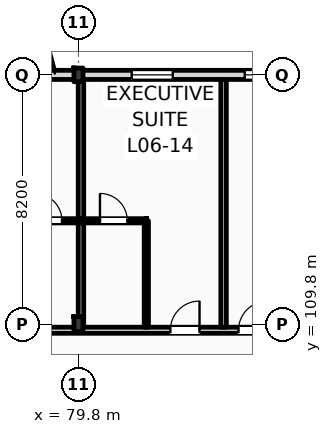
"""IFC4 building model, lengths in metres.
Left out: names, types, materials, properties, quantities, classifications, styles, units other than length and angle.
Written with IfcOpenShell. Run it as: python <this file> out.ifc"""

import sys

from ifc_helpers import new_model, si_unit, direction, frame, frame_2d, origin, origin_2d, place, context, subcontext, project, spatial, rectangle, i_section, extrude, element, fill, save


model = new_model("IFC4")
c1 = context("Model", 3, precision=1e-05, world=origin(), true_north=direction((0.0, 1.0)))
c2 = subcontext(c1, "Body", "Model", "MODEL_VIEW")
j1 = project(units=[si_unit("LENGTHUNIT", "METRE"), si_unit("PLANEANGLEUNIT", "RADIAN")], contexts=[c1])
p1 = place(None, origin())
s1 = spatial("IfcSite", under=j1, at=p1, CompositionType="ELEMENT")
p2 = place(p1, origin())
s2 = spatial("IfcBuilding", under=s1, at=p2, CompositionType="ELEMENT")
p3 = place(p2, frame((0.0, 0.0, 28.2)))
s3 = spatial("IfcBuildingStorey", under=s2, at=p3, CompositionType="ELEMENT", Elevation=28.2)
p4 = place(p3, frame((79.8, 109.8, 0.0), z_axis=(0.0, 0.0, 1.0), x_axis=(1.0, 0.0, 0.0)))
e1 = element("IfcColumn", 1, at=p4, inside=s3, PredefinedType="COLUMN", context=c2, shape_type="SweptSolid", body=[
    extrude(i_section(OverallWidth=0.3, OverallDepth=0.5, WebThickness=0.014, FlangeThickness=0.028, FilletRadius=0.027, at=origin_2d()), origin(), (0.0, 0.0, 1.0), 3.6),
])
p5 = place(p3, frame((79.8, 118.0, 0.0), z_axis=(0.0, 0.0, 1.0), x_axis=(1.0, 0.0, 0.0)))
e2 = element("IfcColumn", 2, at=p5, inside=s3, PredefinedType="COLUMN", context=c2, shape_type="SweptSolid", body=[
    extrude(i_section(OverallWidth=0.3, OverallDepth=0.45, WebThickness=0.014, FlangeThickness=0.026, FilletRadius=0.027, at=origin_2d()), origin(), (0.0, 0.0, 1.0), 3.6),
])
p6 = place(p3, frame((22.5, 118.0, 0.0), z_axis=(0.0, 0.0, 1.0), x_axis=(1.0, 0.0, 0.0)))
e3 = element("IfcWall", 3, at=p6, inside=s3, PredefinedType="STANDARD", context=c2, shape_type="SweptSolid", body=[
    extrude(rectangle(XDim=97.5, YDim=0.3, at=frame_2d((48.75, 0.0))), origin(), (0.0, 0.0, 1.0), 2.8),
])
p7 = place(p6, frame((0.91, 0.0, 0.9)))
e4 = element("IfcOpeningElement", 4, at=p7, cuts=e3, PredefinedType="OPENING", context=c2, shape_type="SweptSolid", body=[
    extrude(rectangle(XDim=0.9, YDim=1.72, at=frame_2d((0.45, 0.86))), frame((0.0, 0.16, 0.0), z_axis=(0.0, -1.0, 0.0), x_axis=(1.0, 0.0, 0.0)), (0.0, 0.0, 1.0), 0.32),
])
p8 = place(p6, frame((6.561, 0.0, 0.0)))
e5 = element("IfcOpeningElement", 5, at=p8, cuts=e3, PredefinedType="OPENING", context=c2, shape_type="SweptSolid", body=[
    extrude(rectangle(XDim=1.2, YDim=2.25, at=frame_2d((0.6, 1.125))), frame((0.0, 0.16, 0.0), z_axis=(0.0, -1.0, 0.0), x_axis=(1.0, 0.0, 0.0)), (0.0, 0.0, 1.0), 0.32),
])
p9 = place(p6, frame((11.477, 0.0, 0.9)))
e6 = element("IfcOpeningElement", 6, at=p9, cuts=e3, PredefinedType="OPENING", context=c2, shape_type="SweptSolid", body=[
    extrude(rectangle(XDim=1.1, YDim=1.5, at=frame_2d((0.55, 0.75))), frame((0.0, 0.16, 0.0), z_axis=(0.0, -1.0, 0.0), x_axis=(1.0, 0.0, 0.0)), (0.0, 0.0, 1.0), 0.32),
])
p10 = place(p6, frame((15.194, 0.0, 0.9)))
e7 = element("IfcOpeningElement", 7, at=p10, cuts=e3, PredefinedType="OPENING", context=c2, shape_type="SweptSolid", body=[
    extrude(rectangle(XDim=1.25, YDim=1.6, at=frame_2d((0.625, 0.8))), frame((0.0, 0.16, 0.0), z_axis=(0.0, -1.0, 0.0), x_axis=(1.0, 0.0, 0.0)), (0.0, 0.0, 1.0), 0.32),
])
p11 = place(p6, frame((19.509, 0.0, 0.9)))
e8 = element("IfcOpeningElement", 8, at=p11, cuts=e3, PredefinedType="OPENING", context=c2, shape_type="SweptSolid", body=[
    extrude(rectangle(XDim=1.4, YDim=1.7, at=frame_2d((0.7, 0.85))), frame((0.0, 0.16, 0.0), z_axis=(0.0, -1.0, 0.0), x_axis=(1.0, 0.0, 0.0)), (0.0, 0.0, 1.0), 0.32),
])
p12 = place(p6, frame((23.258, 0.0, 0.0)))
e9 = element("IfcOpeningElement", 9, at=p12, cuts=e3, PredefinedType="OPENING", context=c2, shape_type="SweptSolid", body=[
    extrude(rectangle(XDim=1.2, YDim=2.25, at=frame_2d((0.6, 1.125))), frame((0.0, 0.16, 0.0), z_axis=(0.0, -1.0, 0.0), x_axis=(1.0, 0.0, 0.0)), (0.0, 0.0, 1.0), 0.32),
])
p13 = place(p6, frame((28.115, 0.0, 0.9)))
e10 = element("IfcOpeningElement", 10, at=p13, cuts=e3, PredefinedType="OPENING", context=c2, shape_type="SweptSolid", body=[
    extrude(rectangle(XDim=1.75, YDim=1.72, at=frame_2d((0.875, 0.86))), frame((0.0, 0.16, 0.0), z_axis=(0.0, -1.0, 0.0), x_axis=(1.0, 0.0, 0.0)), (0.0, 0.0, 1.0), 0.32),
])
p14 = place(p6, frame((31.582, 0.0, 0.9)))
e11 = element("IfcOpeningElement", 11, at=p14, cuts=e3, PredefinedType="OPENING", context=c2, shape_type="SweptSolid", body=[
    extrude(rectangle(XDim=1.35, YDim=1.72, at=frame_2d((0.675, 0.86))), frame((0.0, 0.16, 0.0), z_axis=(0.0, -1.0, 0.0), x_axis=(1.0, 0.0, 0.0)), (0.0, 0.0, 1.0), 0.32),
])
p15 = place(p6, frame((37.379, 0.0, 0.0)))
e12 = element("IfcOpeningElement", 12, at=p15, cuts=e3, PredefinedType="OPENING", context=c2, shape_type="SweptSolid", body=[
    extrude(rectangle(XDim=1.2, YDim=2.25, at=frame_2d((0.6, 1.125))), frame((0.0, 0.16, 0.0), z_axis=(0.0, -1.0, 0.0), x_axis=(1.0, 0.0, 0.0)), (0.0, 0.0, 1.0), 0.32),
])
p16 = place(p6, frame((42.663, 0.0, 0.9)))
e13 = element("IfcOpeningElement", 13, at=p16, cuts=e3, PredefinedType="OPENING", context=c2, shape_type="SweptSolid", body=[
    extrude(rectangle(XDim=1.35, YDim=1.72, at=frame_2d((0.675, 0.86))), frame((0.0, 0.16, 0.0), z_axis=(0.0, -1.0, 0.0), x_axis=(1.0, 0.0, 0.0)), (0.0, 0.0, 1.0), 0.32),
])
p17 = place(p6, frame((45.119, 0.0, 0.9)))
e14 = element("IfcOpeningElement", 14, at=p17, cuts=e3, PredefinedType="OPENING", context=c2, shape_type="SweptSolid", body=[
    extrude(rectangle(XDim=2.871, YDim=1.72, at=frame_2d((1.436, 0.86))), frame((0.0, 0.16, 0.0), z_axis=(0.0, -1.0, 0.0), x_axis=(1.0, 0.0, 0.0)), (0.0, 0.0, 1.0), 0.32),
])
p18 = place(p6, frame((50.41, 0.0, 0.9)))
e15 = element("IfcOpeningElement", 15, at=p18, cuts=e3, PredefinedType="OPENING", context=c2, shape_type="SweptSolid", body=[
    extrude(rectangle(XDim=1.8, YDim=1.72, at=frame_2d((0.9, 0.86))), frame((0.0, 0.16, 0.0), z_axis=(0.0, -1.0, 0.0), x_axis=(1.0, 0.0, 0.0)), (0.0, 0.0, 1.0), 0.32),
])
p19 = place(p6, frame((54.375, 0.0, 0.0)))
e16 = element("IfcOpeningElement", 16, at=p19, cuts=e3, PredefinedType="OPENING", context=c2, shape_type="SweptSolid", body=[
    extrude(rectangle(XDim=1.2, YDim=2.25, at=frame_2d((0.6, 1.125))), frame((0.0, 0.16, 0.0), z_axis=(0.0, -1.0, 0.0), x_axis=(1.0, 0.0, 0.0)), (0.0, 0.0, 1.0), 0.32),
])
p20 = place(p6, frame((59.052, 0.0, 0.9)))
e17 = element("IfcOpeningElement", 17, at=p20, cuts=e3, PredefinedType="OPENING", context=c2, shape_type="SweptSolid", body=[
    extrude(rectangle(XDim=1.35, YDim=1.72, at=frame_2d((0.675, 0.86))), frame((0.0, 0.16, 0.0), z_axis=(0.0, -1.0, 0.0), x_axis=(1.0, 0.0, 0.0)), (0.0, 0.0, 1.0), 0.32),
])
p21 = place(p6, frame((62.768, 0.0, 0.9)))
e18 = element("IfcOpeningElement", 18, at=p21, cuts=e3, PredefinedType="OPENING", context=c2, shape_type="SweptSolid", body=[
    extrude(rectangle(XDim=1.5, YDim=1.72, at=frame_2d((0.75, 0.86))), frame((0.0, 0.16, 0.0), z_axis=(0.0, -1.0, 0.0), x_axis=(1.0, 0.0, 0.0)), (0.0, 0.0, 1.0), 0.32),
])
p22 = place(p6, frame((68.498, 0.0, 0.0)))
e19 = element("IfcOpeningElement", 19, at=p22, cuts=e3, PredefinedType="OPENING", context=c2, shape_type="SweptSolid", body=[
    extrude(rectangle(XDim=1.2, YDim=2.25, at=frame_2d((0.6, 1.125))), frame((0.0, 0.16, 0.0), z_axis=(0.0, -1.0, 0.0), x_axis=(1.0, 0.0, 0.0)), (0.0, 0.0, 1.0), 0.32),
])
p23 = place(p6, frame((71.265, 0.0, 0.9)))
e20 = element("IfcOpeningElement", 20, at=p23, cuts=e3, PredefinedType="OPENING", context=c2, shape_type="SweptSolid", body=[
    extrude(rectangle(XDim=0.9, YDim=1.72, at=frame_2d((0.45, 0.86))), frame((0.0, 0.16, 0.0), z_axis=(0.0, -1.0, 0.0), x_axis=(1.0, 0.0, 0.0)), (0.0, 0.0, 1.0), 0.32),
])
p24 = place(p6, frame((76.316, 0.0, 0.9)))
e21 = element("IfcOpeningElement", 21, at=p24, cuts=e3, PredefinedType="OPENING", context=c2, shape_type="SweptSolid", body=[
    extrude(rectangle(XDim=1.95, YDim=1.72, at=frame_2d((0.975, 0.86))), frame((0.0, 0.16, 0.0), z_axis=(0.0, -1.0, 0.0), x_axis=(1.0, 0.0, 0.0)), (0.0, 0.0, 1.0), 0.32),
])
p25 = place(p6, frame((81.632, 0.0, 0.9)))
e22 = element("IfcOpeningElement", 22, at=p25, cuts=e3, PredefinedType="OPENING", context=c2, shape_type="SweptSolid", body=[
    extrude(rectangle(XDim=1.35, YDim=1.72, at=frame_2d((0.675, 0.86))), frame((0.0, 0.16, 0.0), z_axis=(0.0, -1.0, 0.0), x_axis=(1.0, 0.0, 0.0)), (0.0, 0.0, 1.0), 0.32),
])
p26 = place(p6, frame((84.948, 0.0, 0.9)))
e23 = element("IfcOpeningElement", 23, at=p26, cuts=e3, PredefinedType="OPENING", context=c2, shape_type="SweptSolid", body=[
    extrude(rectangle(XDim=2.25, YDim=1.72, at=frame_2d((1.125, 0.86))), frame((0.0, 0.16, 0.0), z_axis=(0.0, -1.0, 0.0), x_axis=(1.0, 0.0, 0.0)), (0.0, 0.0, 1.0), 0.32),
])
p27 = place(p6, frame((90.063, 0.0, 0.9)))
e24 = element("IfcOpeningElement", 24, at=p27, cuts=e3, PredefinedType="OPENING", context=c2, shape_type="SweptSolid", body=[
    extrude(rectangle(XDim=1.8, YDim=1.72, at=frame_2d((0.9, 0.86))), frame((0.0, 0.16, 0.0), z_axis=(0.0, -1.0, 0.0), x_axis=(1.0, 0.0, 0.0)), (0.0, 0.0, 1.0), 0.32),
])
p28 = place(p6, frame((93.529, 0.0, 0.9)))
e25 = element("IfcOpeningElement", 25, at=p28, cuts=e3, PredefinedType="OPENING", context=c2, shape_type="SweptSolid", body=[
    extrude(rectangle(XDim=2.55, YDim=1.72, at=frame_2d((1.275, 0.86))), frame((0.0, 0.16, 0.0), z_axis=(0.0, -1.0, 0.0), x_axis=(1.0, 0.0, 0.0)), (0.0, 0.0, 1.0), 0.32),
])
p29 = place(p3, frame((10.65, 109.6, 0.0), z_axis=(0.0, 0.0, 1.0), x_axis=(1.0, 0.0, 0.0)))
e26 = element("IfcWall", 26, at=p29, inside=s3, PredefinedType="PARTITIONING", context=c2, shape_type="SweptSolid", body=[
    extrude(rectangle(XDim=109.21, YDim=0.2, at=frame_2d((54.605, 0.0))), origin(), (0.0, 0.0, 1.0), 2.8),
])
p30 = place(p29, frame((12.611, 0.0, 0.0)))
e27 = element("IfcOpeningElement", 27, at=p30, cuts=e26, PredefinedType="OPENING", context=c2, shape_type="SweptSolid", body=[
    extrude(rectangle(XDim=1.02, YDim=2.2, at=frame_2d((0.51, 1.1))), frame((0.0, 0.11, 0.0), z_axis=(0.0, -1.0, 0.0), x_axis=(1.0, 0.0, 0.0)), (0.0, 0.0, 1.0), 0.22),
])
p31 = place(p29, frame((19.451, 0.0, 0.0)))
e28 = element("IfcOpeningElement", 28, at=p31, cuts=e26, PredefinedType="OPENING", context=c2, shape_type="SweptSolid", body=[
    extrude(rectangle(XDim=1.02, YDim=2.2, at=frame_2d((0.51, 1.1))), frame((0.0, 0.11, 0.0), z_axis=(0.0, -1.0, 0.0), x_axis=(1.0, 0.0, 0.0)), (0.0, 0.0, 1.0), 0.22),
])
p32 = place(p29, frame((23.842, 0.0, 0.0)))
e29 = element("IfcOpeningElement", 29, at=p32, cuts=e26, PredefinedType="OPENING", context=c2, shape_type="SweptSolid", body=[
    extrude(rectangle(XDim=1.02, YDim=2.2, at=frame_2d((0.51, 1.1))), frame((0.0, 0.11, 0.0), z_axis=(0.0, -1.0, 0.0), x_axis=(1.0, 0.0, 0.0)), (0.0, 0.0, 1.0), 0.22),
])
p33 = place(p29, frame((26.084, 0.0, 0.0)))
e30 = element("IfcOpeningElement", 30, at=p33, cuts=e26, PredefinedType="OPENING", context=c2, shape_type="SweptSolid", body=[
    extrude(rectangle(XDim=1.02, YDim=2.2, at=frame_2d((0.51, 1.1))), frame((0.0, 0.11, 0.0), z_axis=(0.0, -1.0, 0.0), x_axis=(1.0, 0.0, 0.0)), (0.0, 0.0, 1.0), 0.22),
])
p34 = place(p29, frame((32.655, 0.0, 0.0)))
e31 = element("IfcOpeningElement", 31, at=p34, cuts=e26, PredefinedType="OPENING", context=c2, shape_type="SweptSolid", body=[
    extrude(rectangle(XDim=0.96, YDim=2.2, at=frame_2d((0.48, 1.1))), frame((0.0, 0.11, 0.0), z_axis=(0.0, -1.0, 0.0), x_axis=(1.0, 0.0, 0.0)), (0.0, 0.0, 1.0), 0.22),
])
p35 = place(p29, frame((34.895, 0.0, 0.0)))
e32 = element("IfcOpeningElement", 32, at=p35, cuts=e26, PredefinedType="OPENING", context=c2, shape_type="SweptSolid", body=[
    extrude(rectangle(XDim=0.96, YDim=2.2, at=frame_2d((0.48, 1.1))), frame((0.0, 0.11, 0.0), z_axis=(0.0, -1.0, 0.0), x_axis=(1.0, 0.0, 0.0)), (0.0, 0.0, 1.0), 0.22),
])
p36 = place(p29, frame((41.436, 0.0, 0.0)))
e33 = element("IfcOpeningElement", 33, at=p36, cuts=e26, PredefinedType="OPENING", context=c2, shape_type="SweptSolid", body=[
    extrude(rectangle(XDim=0.96, YDim=2.2, at=frame_2d((0.48, 1.1))), frame((0.0, 0.11, 0.0), z_axis=(0.0, -1.0, 0.0), x_axis=(1.0, 0.0, 0.0)), (0.0, 0.0, 1.0), 0.22),
])
p37 = place(p29, frame((43.427, 0.0, 0.0)))
e34 = element("IfcOpeningElement", 34, at=p37, cuts=e26, PredefinedType="OPENING", context=c2, shape_type="SweptSolid", body=[
    extrude(rectangle(XDim=0.96, YDim=2.2, at=frame_2d((0.48, 1.1))), frame((0.0, 0.11, 0.0), z_axis=(0.0, -1.0, 0.0), x_axis=(1.0, 0.0, 0.0)), (0.0, 0.0, 1.0), 0.22),
])
p38 = place(p29, frame((50.218, 0.0, 0.0)))
e35 = element("IfcOpeningElement", 35, at=p38, cuts=e26, PredefinedType="OPENING", context=c2, shape_type="SweptSolid", body=[
    extrude(rectangle(XDim=0.96, YDim=2.2, at=frame_2d((0.48, 1.1))), frame((0.0, 0.11, 0.0), z_axis=(0.0, -1.0, 0.0), x_axis=(1.0, 0.0, 0.0)), (0.0, 0.0, 1.0), 0.22),
])
p39 = place(p29, frame((54.859, 0.0, 0.0)))
e36 = element("IfcOpeningElement", 36, at=p39, cuts=e26, PredefinedType="OPENING", context=c2, shape_type="SweptSolid", body=[
    extrude(rectangle(XDim=0.96, YDim=2.2, at=frame_2d((0.48, 1.1))), frame((0.0, 0.11, 0.0), z_axis=(0.0, -1.0, 0.0), x_axis=(1.0, 0.0, 0.0)), (0.0, 0.0, 1.0), 0.22),
])
p40 = place(p29, frame((59.0, 0.0, 0.0)))
e37 = element("IfcOpeningElement", 37, at=p40, cuts=e26, PredefinedType="OPENING", context=c2, shape_type="SweptSolid", body=[
    extrude(rectangle(XDim=0.96, YDim=2.2, at=frame_2d((0.48, 1.1))), frame((0.0, 0.11, 0.0), z_axis=(0.0, -1.0, 0.0), x_axis=(1.0, 0.0, 0.0)), (0.0, 0.0, 1.0), 0.22),
])
p41 = place(p29, frame((63.39, 0.0, 0.0)))
e38 = element("IfcOpeningElement", 38, at=p41, cuts=e26, PredefinedType="OPENING", context=c2, shape_type="SweptSolid", body=[
    extrude(rectangle(XDim=0.96, YDim=2.2, at=frame_2d((0.48, 1.1))), frame((0.0, 0.11, 0.0), z_axis=(0.0, -1.0, 0.0), x_axis=(1.0, 0.0, 0.0)), (0.0, 0.0, 1.0), 0.22),
])
p42 = place(p29, frame((65.631, 0.0, 0.0)))
e39 = element("IfcOpeningElement", 39, at=p42, cuts=e26, PredefinedType="OPENING", context=c2, shape_type="SweptSolid", body=[
    extrude(rectangle(XDim=0.96, YDim=2.2, at=frame_2d((0.48, 1.1))), frame((0.0, 0.11, 0.0), z_axis=(0.0, -1.0, 0.0), x_axis=(1.0, 0.0, 0.0)), (0.0, 0.0, 1.0), 0.22),
])
p43 = place(p29, frame((72.172, 0.0, 0.0)))
e40 = element("IfcOpeningElement", 40, at=p43, cuts=e26, PredefinedType="OPENING", context=c2, shape_type="SweptSolid", body=[
    extrude(rectangle(XDim=0.96, YDim=2.2, at=frame_2d((0.48, 1.1))), frame((0.0, 0.11, 0.0), z_axis=(0.0, -1.0, 0.0), x_axis=(1.0, 0.0, 0.0)), (0.0, 0.0, 1.0), 0.22),
])
p44 = place(p29, frame((74.413, 0.0, 0.0)))
e41 = element("IfcOpeningElement", 41, at=p44, cuts=e26, PredefinedType="OPENING", context=c2, shape_type="SweptSolid", body=[
    extrude(rectangle(XDim=0.96, YDim=2.2, at=frame_2d((0.48, 1.1))), frame((0.0, 0.11, 0.0), z_axis=(0.0, -1.0, 0.0), x_axis=(1.0, 0.0, 0.0)), (0.0, 0.0, 1.0), 0.22),
])
p45 = place(p29, frame((80.954, 0.0, 0.0)))
e42 = element("IfcOpeningElement", 42, at=p45, cuts=e26, PredefinedType="OPENING", context=c2, shape_type="SweptSolid", body=[
    extrude(rectangle(XDim=0.96, YDim=2.2, at=frame_2d((0.48, 1.1))), frame((0.0, 0.11, 0.0), z_axis=(0.0, -1.0, 0.0), x_axis=(1.0, 0.0, 0.0)), (0.0, 0.0, 1.0), 0.22),
])
p46 = place(p29, frame((83.195, 0.0, 0.0)))
e43 = element("IfcOpeningElement", 43, at=p46, cuts=e26, PredefinedType="OPENING", context=c2, shape_type="SweptSolid", body=[
    extrude(rectangle(XDim=0.96, YDim=2.2, at=frame_2d((0.48, 1.1))), frame((0.0, 0.11, 0.0), z_axis=(0.0, -1.0, 0.0), x_axis=(1.0, 0.0, 0.0)), (0.0, 0.0, 1.0), 0.22),
])
p47 = place(p29, frame((89.735, 0.0, 0.0)))
e44 = element("IfcOpeningElement", 44, at=p47, cuts=e26, PredefinedType="OPENING", context=c2, shape_type="SweptSolid", body=[
    extrude(rectangle(XDim=0.96, YDim=2.2, at=frame_2d((0.48, 1.1))), frame((0.0, 0.11, 0.0), z_axis=(0.0, -1.0, 0.0), x_axis=(1.0, 0.0, 0.0)), (0.0, 0.0, 1.0), 0.22),
])
p48 = place(p29, frame((94.126, 0.0, 0.0)))
e45 = element("IfcOpeningElement", 45, at=p48, cuts=e26, PredefinedType="OPENING", context=c2, shape_type="SweptSolid", body=[
    extrude(rectangle(XDim=0.96, YDim=2.2, at=frame_2d((0.48, 1.1))), frame((0.0, 0.11, 0.0), z_axis=(0.0, -1.0, 0.0), x_axis=(1.0, 0.0, 0.0)), (0.0, 0.0, 1.0), 0.22),
])
p49 = place(p29, frame((98.517, 0.0, 0.0)))
e46 = element("IfcOpeningElement", 46, at=p49, cuts=e26, PredefinedType="OPENING", context=c2, shape_type="SweptSolid", body=[
    extrude(rectangle(XDim=0.96, YDim=2.2, at=frame_2d((0.48, 1.1))), frame((0.0, 0.11, 0.0), z_axis=(0.0, -1.0, 0.0), x_axis=(1.0, 0.0, 0.0)), (0.0, 0.0, 1.0), 0.22),
])
p50 = place(p29, frame((102.908, 0.0, 0.0)))
e47 = element("IfcOpeningElement", 47, at=p50, cuts=e26, PredefinedType="OPENING", context=c2, shape_type="SweptSolid", body=[
    extrude(rectangle(XDim=0.96, YDim=2.2, at=frame_2d((0.48, 1.1))), frame((0.0, 0.11, 0.0), z_axis=(0.0, -1.0, 0.0), x_axis=(1.0, 0.0, 0.0)), (0.0, 0.0, 1.0), 0.22),
])
p51 = place(p29, frame((105.099, 0.0, 0.0)))
e48 = element("IfcOpeningElement", 48, at=p51, cuts=e26, PredefinedType="OPENING", context=c2, shape_type="SweptSolid", body=[
    extrude(rectangle(XDim=0.96, YDim=2.2, at=frame_2d((0.48, 1.1))), frame((0.0, 0.11, 0.0), z_axis=(0.0, -1.0, 0.0), x_axis=(1.0, 0.0, 0.0)), (0.0, 0.0, 1.0), 0.22),
])
p52 = place(p29, frame((2.716, 0.0, 0.0)))
e49 = element("IfcOpeningElement", 49, at=p52, cuts=e26, PredefinedType="OPENING", context=c2, shape_type="SweptSolid", body=[
    extrude(rectangle(XDim=1.35, YDim=2.25, at=frame_2d((0.675, 1.125))), frame((0.0, 0.11, 0.0), z_axis=(0.0, -1.0, 0.0), x_axis=(1.0, 0.0, 0.0)), (0.0, 0.0, 1.0), 0.22),
])
p53 = place(p29, frame((6.65, 0.0, 0.0)))
e50 = element("IfcOpeningElement", 50, at=p53, cuts=e26, PredefinedType="OPENING", context=c2, shape_type="SweptSolid", body=[
    extrude(rectangle(XDim=1.35, YDim=2.25, at=frame_2d((0.675, 1.125))), frame((0.0, 0.11, 0.0), z_axis=(0.0, -1.0, 0.0), x_axis=(1.0, 0.0, 0.0)), (0.0, 0.0, 1.0), 0.22),
])
p54 = place(p29, frame((10.583, 0.0, 0.0)))
e51 = element("IfcOpeningElement", 51, at=p54, cuts=e26, PredefinedType="OPENING", context=c2, shape_type="SweptSolid", body=[
    extrude(rectangle(XDim=1.35, YDim=2.25, at=frame_2d((0.675, 1.125))), frame((0.0, 0.11, 0.0), z_axis=(0.0, -1.0, 0.0), x_axis=(1.0, 0.0, 0.0)), (0.0, 0.0, 1.0), 0.22),
])
p55 = place(p3, frame((79.882, 109.7, 0.0), z_axis=(0.0, 0.0, 1.0), x_axis=(0.0, 1.0, 0.0)))
e52 = element("IfcWall", 52, at=p55, inside=s3, PredefinedType="PARTITIONING", context=c2, shape_type="SweptSolid", body=[
    extrude(rectangle(XDim=8.15, YDim=0.18, at=frame_2d((4.075, 0.0))), origin(), (0.0, 0.0, 1.0), 2.99),
])
p56 = place(p3, frame((77.732, 113.2, 0.0), z_axis=(0.0, 0.0, 1.0), x_axis=(1.0, 0.0, 0.0)))
e53 = element("IfcWall", 53, at=p56, inside=s3, PredefinedType="PARTITIONING", context=c2, shape_type="SweptSolid", body=[
    extrude(rectangle(XDim=2.15, YDim=0.14, at=frame_2d((1.075, 0.0))), origin(), (0.0, 0.0, 1.0), 3.36),
])
p57 = place(p56, frame((0.625, 0.0, 0.0)))
e54 = element("IfcOpeningElement", 54, at=p57, cuts=e53, PredefinedType="OPENING", context=c2, shape_type="SweptSolid", body=[
    extrude(rectangle(XDim=0.9, YDim=2.1, at=frame_2d((0.45, 1.05))), frame((0.0, 0.08, 0.0), z_axis=(0.0, -1.0, 0.0), x_axis=(1.0, 0.0, 0.0)), (0.0, 0.0, 1.0), 0.16),
])
p58 = place(p3, frame((84.573, 109.7, 0.0), z_axis=(0.0, 0.0, 1.0), x_axis=(0.0, 1.0, 0.0)))
e55 = element("IfcWall", 55, at=p58, inside=s3, PredefinedType="PARTITIONING", context=c2, shape_type="SweptSolid", body=[
    extrude(rectangle(XDim=8.15, YDim=0.18, at=frame_2d((4.075, 0.0))), origin(), (0.0, 0.0, 1.0), 3.36),
])
p59 = place(p3, frame((82.032, 109.7, 0.0), z_axis=(0.0, 0.0, 1.0), x_axis=(0.0, 1.0, 0.0)))
e56 = element("IfcWall", 56, at=p59, inside=s3, PredefinedType="PARTITIONING", context=c2, shape_type="SweptSolid", body=[
    extrude(rectangle(XDim=3.5, YDim=0.14, at=frame_2d((1.75, 0.0))), origin(), (0.0, 0.0, 1.0), 3.36),
])
p60 = place(p3, frame((79.882, 113.2, 0.0), z_axis=(0.0, 0.0, 1.0), x_axis=(1.0, 0.0, 0.0)))
e57 = element("IfcWall", 57, at=p60, inside=s3, PredefinedType="PARTITIONING", context=c2, shape_type="SweptSolid", body=[
    extrude(rectangle(XDim=2.15, YDim=0.14, at=frame_2d((1.075, 0.0))), origin(), (0.0, 0.0, 1.0), 3.36),
])
p61 = place(p60, frame((0.625, 0.0, 0.0)))
e58 = element("IfcOpeningElement", 58, at=p61, cuts=e57, PredefinedType="OPENING", context=c2, shape_type="SweptSolid", body=[
    extrude(rectangle(XDim=0.9, YDim=2.1, at=frame_2d((0.45, 1.05))), frame((0.0, 0.08, 0.0), z_axis=(0.0, -1.0, 0.0), x_axis=(1.0, 0.0, 0.0)), (0.0, 0.0, 1.0), 0.16),
])
p62 = place(p20, origin())
e59 = element("IfcWindow", 59, at=p62, inside=s3, PartitioningType="DOUBLE_PANEL_VERTICAL", PredefinedType="WINDOW", context=c2, shape_type="SweptSolid", body=[
    extrude(rectangle(XDim=1.35, YDim=1.72, at=frame_2d((0.675, 0.86))), frame((0.0, 0.03, 0.0), z_axis=(0.0, -1.0, 0.0), x_axis=(1.0, 0.0, 0.0)), (0.0, 0.0, 1.0), 0.06),
])
fill(e17, e59)
p63 = place(p21, origin())
e60 = element("IfcWindow", 60, at=p63, inside=s3, PartitioningType="DOUBLE_PANEL_VERTICAL", PredefinedType="WINDOW", context=c2, shape_type="SweptSolid", body=[
    extrude(rectangle(XDim=1.5, YDim=1.72, at=frame_2d((0.75, 0.86))), frame((0.0, 0.03, 0.0), z_axis=(0.0, -1.0, 0.0), x_axis=(1.0, 0.0, 0.0)), (0.0, 0.0, 1.0), 0.06),
])
fill(e18, e60)
p64 = place(p57, origin())
e61 = element("IfcDoor", 61, at=p64, inside=s3, OperationType="SINGLE_SWING_LEFT", PredefinedType="DOOR", context=c2, shape_type="SweptSolid", body=[
    extrude(rectangle(XDim=0.9, YDim=2.1, at=frame_2d((0.45, 1.05))), frame((0.0, 0.025, 0.0), z_axis=(0.0, -1.0, 0.0), x_axis=(1.0, 0.0, 0.0)), (0.0, 0.0, 1.0), 0.05),
])
fill(e54, e61)
p65 = place(p43, origin())
e62 = element("IfcDoor", 62, at=p65, inside=s3, OperationType="SINGLE_SWING_RIGHT", PredefinedType="DOOR", context=c2, shape_type="SweptSolid", body=[
    extrude(rectangle(XDim=0.96, YDim=2.2, at=frame_2d((0.48, 1.1))), frame((0.0, 0.025, 0.0), z_axis=(0.0, -1.0, 0.0), x_axis=(1.0, 0.0, 0.0)), (0.0, 0.0, 1.0), 0.05),
])
fill(e40, e62)
p66 = place(p61, origin())
e63 = element("IfcDoor", 63, at=p66, inside=s3, OperationType="SINGLE_SWING_LEFT", PredefinedType="DOOR", context=c2, shape_type="SweptSolid", body=[
    extrude(rectangle(XDim=0.9, YDim=2.1, at=frame_2d((0.45, 1.05))), frame((0.0, 0.025, 0.0), z_axis=(0.0, -1.0, 0.0), x_axis=(1.0, 0.0, 0.0)), (0.0, 0.0, 1.0), 0.05),
])
fill(e58, e63)
p67 = place(p44, origin())
e64 = element("IfcDoor", 64, at=p67, inside=s3, OperationType="SINGLE_SWING_RIGHT", PredefinedType="DOOR", context=c2, shape_type="SweptSolid", body=[
    extrude(rectangle(XDim=0.96, YDim=2.2, at=frame_2d((0.48, 1.1))), frame((0.0, 0.025, 0.0), z_axis=(0.0, -1.0, 0.0), x_axis=(1.0, 0.0, 0.0)), (0.0, 0.0, 1.0), 0.05),
])
fill(e41, e64)
save(model, sys.argv[1])
